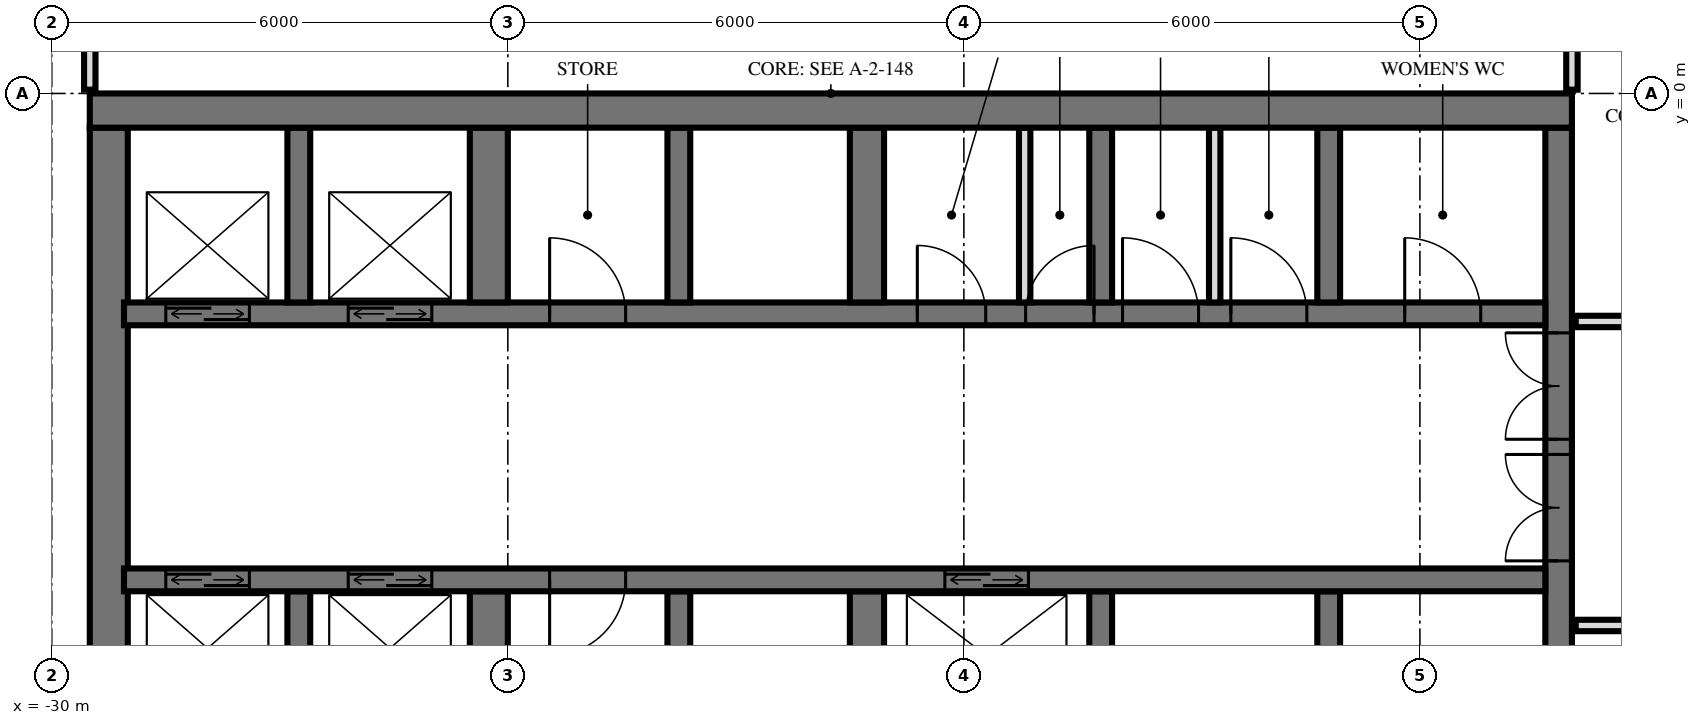
"""IFC4 building model, lengths in metres.
Left out: names, types, materials, properties, quantities, classifications, styles, units other than length and angle.
Written with IfcOpenShell. Run it as: python <this file> out.ifc"""

import sys

from ifc_helpers import new_model, si_unit, direction, frame, frame_2d, origin, place, context, subcontext, project, spatial, rectangle, extrude, element, fill, save


model = new_model("IFC4")
c1 = context("Model", 3, precision=1e-05, world=origin(), true_north=direction((0.0, 1.0)))
c2 = subcontext(c1, "Body", "Model", "MODEL_VIEW")
j1 = project(units=[si_unit("LENGTHUNIT", "METRE"), si_unit("PLANEANGLEUNIT", "RADIAN")], contexts=[c1])
p1 = place(None, origin())
s1 = spatial("IfcSite", under=j1, at=p1, CompositionType="ELEMENT")
p2 = place(p1, origin())
s2 = spatial("IfcBuilding", under=s1, at=p2, CompositionType="ELEMENT")
p3 = place(p2, frame((0.0, 0.0, 81.6)))
s3 = spatial("IfcBuildingStorey", under=s2, at=p3, CompositionType="ELEMENT", Elevation=81.6)
p4 = place(p3, frame((-29.5, -0.225, 0.0), z_axis=(0.0, 0.0, 1.0), x_axis=(1.0, 0.0, 0.0)))
e1 = element("IfcWall", 1, at=p4, inside=s3, PredefinedType="SHEAR", context=c2, shape_type="SweptSolid", body=[
    extrude(rectangle(XDim=19.5, YDim=0.45, at=frame_2d((9.75, 0.0))), origin(), (0.0, 0.0, 1.0), 3.6),
])
p5 = place(p3, frame((-10.175, -14.55, 0.0), z_axis=(0.0, 0.0, 1.0), x_axis=(0.0, 1.0, 0.0)))
e2 = element("IfcWall", 2, at=p5, inside=s3, PredefinedType="SHEAR", context=c2, shape_type="SweptSolid", body=[
    extrude(rectangle(XDim=14.1, YDim=0.35, at=frame_2d((7.05, 0.0))), origin(), (0.0, 0.0, 1.0), 3.6),
])
p6 = place(p5, frame((8.4, 0.0, 0.0)))
e3 = element("IfcOpeningElement", 3, at=p6, cuts=e2, PredefinedType="OPENING", context=c2, shape_type="SweptSolid", body=[
    extrude(rectangle(XDim=1.4, YDim=2.4, at=frame_2d((0.7, 1.2))), frame((0.0, 0.185, 0.0), z_axis=(0.0, -1.0, 0.0), x_axis=(1.0, 0.0, 0.0)), (0.0, 0.0, 1.0), 0.37),
])
p7 = place(p5, frame((10.0, 0.0, 0.0)))
e4 = element("IfcOpeningElement", 4, at=p7, cuts=e2, PredefinedType="OPENING", context=c2, shape_type="SweptSolid", body=[
    extrude(rectangle(XDim=1.4, YDim=2.4, at=frame_2d((0.7, 1.2))), frame((0.0, 0.185, 0.0), z_axis=(0.0, -1.0, 0.0), x_axis=(1.0, 0.0, 0.0)), (0.0, 0.0, 1.0), 0.37),
])
p8 = place(p5, frame((4.0, 0.0, 0.0)))
e5 = element("IfcOpeningElement", 5, at=p8, cuts=e2, PredefinedType="OPENING", context=c2, shape_type="SweptSolid", body=[
    extrude(rectangle(XDim=1.2, YDim=2.1, at=frame_2d((0.6, 1.05))), frame((0.0, 0.185, 0.0), z_axis=(0.0, -1.0, 0.0), x_axis=(1.0, 0.0, 0.0)), (0.0, 0.0, 1.0), 0.37),
])
p9 = place(p3, frame((-29.25, -14.55, 0.0), z_axis=(0.0, 0.0, 1.0), x_axis=(0.0, 1.0, 0.0)))
e6 = element("IfcWall", 6, at=p9, inside=s3, PredefinedType="SHEAR", context=c2, shape_type="SweptSolid", body=[
    extrude(rectangle(XDim=14.1, YDim=0.5, at=frame_2d((7.05, 0.0))), origin(), (0.0, 0.0, 1.0), 3.6),
])
p10 = place(p3, frame((-29.05, -2.9, 0.0), z_axis=(0.0, 0.0, 1.0), x_axis=(1.0, 0.0, 0.0)))
e7 = element("IfcWall", 7, at=p10, inside=s3, PredefinedType="SHEAR", context=c2, shape_type="SweptSolid", body=[
    extrude(rectangle(XDim=18.7, YDim=0.3, at=frame_2d((9.35, 0.0))), origin(), (0.0, 0.0, 1.0), 3.6),
])
p11 = place(p10, frame((2.95, 0.0, 0.0)))
e8 = element("IfcOpeningElement", 8, at=p11, cuts=e7, PredefinedType="OPENING", context=c2, shape_type="SweptSolid", body=[
    extrude(rectangle(XDim=1.1, YDim=2.1, at=frame_2d((0.55, 1.05))), frame((0.0, 0.16, 0.0), z_axis=(0.0, -1.0, 0.0), x_axis=(1.0, 0.0, 0.0)), (0.0, 0.0, 1.0), 0.32),
])
p12 = place(p10, frame((0.55, 0.0, 0.0)))
e9 = element("IfcOpeningElement", 9, at=p12, cuts=e7, PredefinedType="OPENING", context=c2, shape_type="SweptSolid", body=[
    extrude(rectangle(XDim=1.1, YDim=2.1, at=frame_2d((0.55, 1.05))), frame((0.0, 0.16, 0.0), z_axis=(0.0, -1.0, 0.0), x_axis=(1.0, 0.0, 0.0)), (0.0, 0.0, 1.0), 0.32),
])
p13 = place(p10, frame((11.863, 0.0, 0.0)))
e10 = element("IfcOpeningElement", 10, at=p13, cuts=e7, PredefinedType="OPENING", context=c2, shape_type="SweptSolid", body=[
    extrude(rectangle(XDim=0.9, YDim=2.1, at=frame_2d((0.45, 1.05))), frame((0.0, 0.16, 0.0), z_axis=(0.0, -1.0, 0.0), x_axis=(1.0, 0.0, 0.0)), (0.0, 0.0, 1.0), 0.32),
])
p14 = place(p10, frame((10.438, 0.0, 0.0)))
e11 = element("IfcOpeningElement", 11, at=p14, cuts=e7, PredefinedType="OPENING", context=c2, shape_type="SweptSolid", body=[
    extrude(rectangle(XDim=0.9, YDim=2.1, at=frame_2d((0.45, 1.05))), frame((0.0, 0.16, 0.0), z_axis=(0.0, -1.0, 0.0), x_axis=(1.0, 0.0, 0.0)), (0.0, 0.0, 1.0), 0.32),
])
p15 = place(p10, frame((16.85, 0.0, 0.0)))
e12 = element("IfcOpeningElement", 12, at=p15, cuts=e7, PredefinedType="OPENING", context=c2, shape_type="SweptSolid", body=[
    extrude(rectangle(XDim=1.0, YDim=2.1, at=frame_2d((0.5, 1.05))), frame((0.0, 0.16, 0.0), z_axis=(0.0, -1.0, 0.0), x_axis=(1.0, 0.0, 0.0)), (0.0, 0.0, 1.0), 0.32),
])
p16 = place(p10, frame((14.562, 0.0, 0.0)))
e13 = element("IfcOpeningElement", 13, at=p16, cuts=e7, PredefinedType="OPENING", context=c2, shape_type="SweptSolid", body=[
    extrude(rectangle(XDim=1.0, YDim=2.1, at=frame_2d((0.5, 1.05))), frame((0.0, 0.16, 0.0), z_axis=(0.0, -1.0, 0.0), x_axis=(1.0, 0.0, 0.0)), (0.0, 0.0, 1.0), 0.32),
])
p17 = place(p10, frame((13.137, 0.0, 0.0)))
e14 = element("IfcOpeningElement", 14, at=p17, cuts=e7, PredefinedType="OPENING", context=c2, shape_type="SweptSolid", body=[
    extrude(rectangle(XDim=1.0, YDim=2.1, at=frame_2d((0.5, 1.05))), frame((0.0, 0.16, 0.0), z_axis=(0.0, -1.0, 0.0), x_axis=(1.0, 0.0, 0.0)), (0.0, 0.0, 1.0), 0.32),
])
p18 = place(p10, frame((5.6, 0.0, 0.0)))
e15 = element("IfcOpeningElement", 15, at=p18, cuts=e7, PredefinedType="OPENING", context=c2, shape_type="SweptSolid", body=[
    extrude(rectangle(XDim=1.0, YDim=2.1, at=frame_2d((0.5, 1.05))), frame((0.0, 0.16, 0.0), z_axis=(0.0, -1.0, 0.0), x_axis=(1.0, 0.0, 0.0)), (0.0, 0.0, 1.0), 0.32),
])
p19 = place(p3, frame((-29.05, -6.4, 0.0), z_axis=(0.0, 0.0, 1.0), x_axis=(1.0, 0.0, 0.0)))
e16 = element("IfcWall", 16, at=p19, inside=s3, PredefinedType="SHEAR", context=c2, shape_type="SweptSolid", body=[
    extrude(rectangle(XDim=18.7, YDim=0.3, at=frame_2d((9.35, 0.0))), origin(), (0.0, 0.0, 1.0), 3.6),
])
p20 = place(p19, frame((2.95, 0.0, 0.0)))
e17 = element("IfcOpeningElement", 17, at=p20, cuts=e16, PredefinedType="OPENING", context=c2, shape_type="SweptSolid", body=[
    extrude(rectangle(XDim=1.1, YDim=2.1, at=frame_2d((0.55, 1.05))), frame((0.0, 0.16, 0.0), z_axis=(0.0, -1.0, 0.0), x_axis=(1.0, 0.0, 0.0)), (0.0, 0.0, 1.0), 0.32),
])
p21 = place(p19, frame((0.55, 0.0, 0.0)))
e18 = element("IfcOpeningElement", 18, at=p21, cuts=e16, PredefinedType="OPENING", context=c2, shape_type="SweptSolid", body=[
    extrude(rectangle(XDim=1.1, YDim=2.1, at=frame_2d((0.55, 1.05))), frame((0.0, 0.16, 0.0), z_axis=(0.0, -1.0, 0.0), x_axis=(1.0, 0.0, 0.0)), (0.0, 0.0, 1.0), 0.32),
])
p22 = place(p19, frame((10.8, 0.0, 0.0)))
e19 = element("IfcOpeningElement", 19, at=p22, cuts=e16, PredefinedType="OPENING", context=c2, shape_type="SweptSolid", body=[
    extrude(rectangle(XDim=1.1, YDim=2.1, at=frame_2d((0.55, 1.05))), frame((0.0, 0.16, 0.0), z_axis=(0.0, -1.0, 0.0), x_axis=(1.0, 0.0, 0.0)), (0.0, 0.0, 1.0), 0.32),
])
p23 = place(p19, frame((5.6, 0.0, 0.0)))
e20 = element("IfcOpeningElement", 20, at=p23, cuts=e16, PredefinedType="OPENING", context=c2, shape_type="SweptSolid", body=[
    extrude(rectangle(XDim=1.0, YDim=2.1, at=frame_2d((0.5, 1.05))), frame((0.0, 0.16, 0.0), z_axis=(0.0, -1.0, 0.0), x_axis=(1.0, 0.0, 0.0)), (0.0, 0.0, 1.0), 0.32),
])
for number, where, z_axis, x_axis in (
    (21, (-13.2, -2.75, 0.0), (0.0, 0.0, 1.0), (0.0, 1.0, 0.0)),
    (22, (-13.2, -8.85, 0.0), (0.0, 0.0, 1.0), (0.0, 1.0, 0.0)),
    (23, (-16.2, -2.75, 0.0), (0.0, 0.0, 1.0), (0.0, 1.0, 0.0)),
    (24, (-16.2, -8.85, 0.0), (0.0, 0.0, 1.0), (0.0, 1.0, 0.0)),
):
    element("IfcWall", number, at=place(p3, frame(where, z_axis=z_axis, x_axis=x_axis)), inside=s3, PredefinedType="SHEAR", context=c2, shape_type="SweptSolid", body=[
        extrude(rectangle(XDim=2.3, YDim=0.3, at=frame_2d((1.15, 0.0))), origin(), (0.0, 0.0, 1.0), 3.6),
    ])
for number, where, z_axis, x_axis in (
    (25, (-19.275, -2.75, 0.0), (0.0, 0.0, 1.0), (0.0, 1.0, 0.0)),
    (26, (-19.275, -8.85, 0.0), (0.0, 0.0, 1.0), (0.0, 1.0, 0.0)),
):
    element("IfcWall", number, at=place(p3, frame(where, z_axis=z_axis, x_axis=x_axis)), inside=s3, PredefinedType="SHEAR", context=c2, shape_type="SweptSolid", body=[
        extrude(rectangle(XDim=2.3, YDim=0.45, at=frame_2d((1.15, 0.0))), origin(), (0.0, 0.0, 1.0), 3.6),
    ])
for number, where, z_axis, x_axis in (
    (27, (-21.75, -2.75, 0.0), (0.0, 0.0, 1.0), (0.0, 1.0, 0.0)),
    (28, (-21.75, -8.85, 0.0), (0.0, 0.0, 1.0), (0.0, 1.0, 0.0)),
):
    element("IfcWall", number, at=place(p3, frame(where, z_axis=z_axis, x_axis=x_axis)), inside=s3, PredefinedType="SHEAR", context=c2, shape_type="SweptSolid", body=[
        extrude(rectangle(XDim=2.3, YDim=0.3, at=frame_2d((1.15, 0.0))), origin(), (0.0, 0.0, 1.0), 3.6),
    ])
for number, where, z_axis, x_axis in (
    (29, (-24.25, -2.75, 0.0), (0.0, 0.0, 1.0), (0.0, 1.0, 0.0)),
    (30, (-24.25, -8.85, 0.0), (0.0, 0.0, 1.0), (0.0, 1.0, 0.0)),
):
    element("IfcWall", number, at=place(p3, frame(where, z_axis=z_axis, x_axis=x_axis)), inside=s3, PredefinedType="SHEAR", context=c2, shape_type="SweptSolid", body=[
        extrude(rectangle(XDim=2.3, YDim=0.5, at=frame_2d((1.15, 0.0))), origin(), (0.0, 0.0, 1.0), 3.6),
    ])
for number, where, z_axis, x_axis in (
    (31, (-26.75, -2.75, 0.0), (0.0, 0.0, 1.0), (0.0, 1.0, 0.0)),
    (32, (-26.75, -8.85, 0.0), (0.0, 0.0, 1.0), (0.0, 1.0, 0.0)),
):
    element("IfcWall", number, at=place(p3, frame(where, z_axis=z_axis, x_axis=x_axis)), inside=s3, PredefinedType="SHEAR", context=c2, shape_type="SweptSolid", body=[
        extrude(rectangle(XDim=2.3, YDim=0.3, at=frame_2d((1.15, 0.0))), origin(), (0.0, 0.0, 1.0), 3.6),
    ])
for number, where, z_axis, x_axis in (
    (33, (-17.2, -2.75, 0.0), (0.0, 0.0, 1.0), (0.0, 1.0, 0.0)),
    (34, (-14.7, -2.75, 0.0), (0.0, 0.0, 1.0), (0.0, 1.0, 0.0)),
):
    element("IfcWall", number, at=place(p3, frame(where, z_axis=z_axis, x_axis=x_axis)), inside=s3, PredefinedType="PARTITIONING", context=c2, shape_type="SweptSolid", body=[
        extrude(rectangle(XDim=2.3, YDim=0.15, at=frame_2d((1.15, 0.0))), origin(), (0.0, 0.0, 1.0), 3.3),
    ])
p24 = place(p3, frame((-10.0, 0.05, 0.0), z_axis=(0.0, 0.0, 1.0), x_axis=(0.0, 1.0, 0.0)))
e35 = element("IfcWall", 35, at=p24, inside=s3, PredefinedType="PARTITIONING", context=c2, shape_type="SweptSolid", body=[
    extrude(rectangle(XDim=0.97, YDim=0.15, at=frame_2d((0.485, 0.0))), origin(), (0.0, 0.0, 1.0), 3.32),
])
p25 = place(p3, frame((-29.5, 0.05, 0.0), z_axis=(0.0, 0.0, 1.0), x_axis=(0.0, 1.0, 0.0)))
e36 = element("IfcWall", 36, at=p25, inside=s3, PredefinedType="PARTITIONING", context=c2, shape_type="SweptSolid", body=[
    extrude(rectangle(XDim=0.827, YDim=0.15, at=frame_2d((0.414, 0.0))), origin(), (0.0, 0.0, 1.0), 3.32),
])
p26 = place(p3, frame((-9.95, -7.0, 0.0), z_axis=(0.0, 0.0, 1.0), x_axis=(1.0, 0.0, 0.0)))
e37 = element("IfcWall", 37, at=p26, inside=s3, PredefinedType="PARTITIONING", context=c2, shape_type="SweptSolid", body=[
    extrude(rectangle(XDim=19.9, YDim=0.15, at=frame_2d((9.95, 0.0))), origin(), (0.0, 0.0, 1.0), 3.32),
])
p27 = place(p26, frame((9.45, 0.0, 0.0)))
e38 = element("IfcOpeningElement", 38, at=p27, cuts=e37, PredefinedType="OPENING", context=c2, shape_type="SweptSolid", body=[
    extrude(rectangle(XDim=1.0, YDim=2.1, at=frame_2d((0.5, 1.05))), frame((0.0, 0.085, 0.0), z_axis=(0.0, -1.0, 0.0), x_axis=(1.0, 0.0, 0.0)), (0.0, 0.0, 1.0), 0.17),
])
p28 = place(p26, frame((15.45, 0.0, 0.0)))
e39 = element("IfcOpeningElement", 39, at=p28, cuts=e37, PredefinedType="OPENING", context=c2, shape_type="SweptSolid", body=[
    extrude(rectangle(XDim=1.0, YDim=2.1, at=frame_2d((0.5, 1.05))), frame((0.0, 0.085, 0.0), z_axis=(0.0, -1.0, 0.0), x_axis=(1.0, 0.0, 0.0)), (0.0, 0.0, 1.0), 0.17),
])
p29 = place(p3, frame((-9.95, -3.0, 0.0), z_axis=(0.0, 0.0, 1.0), x_axis=(1.0, 0.0, 0.0)))
e40 = element("IfcWall", 40, at=p29, inside=s3, PredefinedType="PARTITIONING", context=c2, shape_type="SweptSolid", body=[
    extrude(rectangle(XDim=19.9, YDim=0.15, at=frame_2d((9.95, 0.0))), origin(), (0.0, 0.0, 1.0), 3.32),
])
p30 = place(p29, frame((2.2, 0.0, 0.0)))
e41 = element("IfcOpeningElement", 41, at=p30, cuts=e40, PredefinedType="OPENING", context=c2, shape_type="SweptSolid", body=[
    extrude(rectangle(XDim=1.0, YDim=2.1, at=frame_2d((0.5, 1.05))), frame((0.0, 0.085, 0.0), z_axis=(0.0, -1.0, 0.0), x_axis=(1.0, 0.0, 0.0)), (0.0, 0.0, 1.0), 0.17),
])
p31 = place(p29, frame((7.2, 0.0, 0.0)))
e42 = element("IfcOpeningElement", 42, at=p31, cuts=e40, PredefinedType="OPENING", context=c2, shape_type="SweptSolid", body=[
    extrude(rectangle(XDim=1.0, YDim=2.1, at=frame_2d((0.5, 1.05))), frame((0.0, 0.085, 0.0), z_axis=(0.0, -1.0, 0.0), x_axis=(1.0, 0.0, 0.0)), (0.0, 0.0, 1.0), 0.17),
])
p32 = place(p29, frame((11.7, 0.0, 0.0)))
e43 = element("IfcOpeningElement", 43, at=p32, cuts=e40, PredefinedType="OPENING", context=c2, shape_type="SweptSolid", body=[
    extrude(rectangle(XDim=1.0, YDim=2.1, at=frame_2d((0.5, 1.05))), frame((0.0, 0.085, 0.0), z_axis=(0.0, -1.0, 0.0), x_axis=(1.0, 0.0, 0.0)), (0.0, 0.0, 1.0), 0.17),
])
p33 = place(p29, frame((15.45, 0.0, 0.0)))
e44 = element("IfcOpeningElement", 44, at=p33, cuts=e40, PredefinedType="OPENING", context=c2, shape_type="SweptSolid", body=[
    extrude(rectangle(XDim=1.0, YDim=2.1, at=frame_2d((0.5, 1.05))), frame((0.0, 0.085, 0.0), z_axis=(0.0, -1.0, 0.0), x_axis=(1.0, 0.0, 0.0)), (0.0, 0.0, 1.0), 0.17),
])
p34 = place(p29, frame((18.2, 0.0, 0.0)))
e45 = element("IfcOpeningElement", 45, at=p34, cuts=e40, PredefinedType="OPENING", context=c2, shape_type="SweptSolid", body=[
    extrude(rectangle(XDim=1.0, YDim=2.1, at=frame_2d((0.5, 1.05))), frame((0.0, 0.085, 0.0), z_axis=(0.0, -1.0, 0.0), x_axis=(1.0, 0.0, 0.0)), (0.0, 0.0, 1.0), 0.17),
])
p35 = place(p11, origin())
e46 = element("IfcDoor", 46, at=p35, inside=s3, OperationType="DOUBLE_DOOR_SLIDING", PredefinedType="USERDEFINED", context=c2, shape_type="SweptSolid", body=[
    extrude(rectangle(XDim=1.1, YDim=2.1, at=frame_2d((0.55, 1.05))), frame((0.0, 0.025, 0.0), z_axis=(0.0, -1.0, 0.0), x_axis=(1.0, 0.0, 0.0)), (0.0, 0.0, 1.0), 0.05),
])
fill(e8, e46)
p36 = place(p12, origin())
e47 = element("IfcDoor", 47, at=p36, inside=s3, OperationType="DOUBLE_DOOR_SLIDING", PredefinedType="USERDEFINED", context=c2, shape_type="SweptSolid", body=[
    extrude(rectangle(XDim=1.1, YDim=2.1, at=frame_2d((0.55, 1.05))), frame((0.0, 0.025, 0.0), z_axis=(0.0, -1.0, 0.0), x_axis=(1.0, 0.0, 0.0)), (0.0, 0.0, 1.0), 0.05),
])
fill(e9, e47)
p37 = place(p20, origin())
e48 = element("IfcDoor", 48, at=p37, inside=s3, OperationType="DOUBLE_DOOR_SLIDING", PredefinedType="USERDEFINED", context=c2, shape_type="SweptSolid", body=[
    extrude(rectangle(XDim=1.1, YDim=2.1, at=frame_2d((0.55, 1.05))), frame((0.0, 0.025, 0.0), z_axis=(0.0, -1.0, 0.0), x_axis=(1.0, 0.0, 0.0)), (0.0, 0.0, 1.0), 0.05),
])
fill(e17, e48)
p38 = place(p21, origin())
e49 = element("IfcDoor", 49, at=p38, inside=s3, OperationType="DOUBLE_DOOR_SLIDING", PredefinedType="USERDEFINED", context=c2, shape_type="SweptSolid", body=[
    extrude(rectangle(XDim=1.1, YDim=2.1, at=frame_2d((0.55, 1.05))), frame((0.0, 0.025, 0.0), z_axis=(0.0, -1.0, 0.0), x_axis=(1.0, 0.0, 0.0)), (0.0, 0.0, 1.0), 0.05),
])
fill(e18, e49)
p39 = place(p22, origin())
e50 = element("IfcDoor", 50, at=p39, inside=s3, OperationType="DOUBLE_DOOR_SLIDING", PredefinedType="USERDEFINED", context=c2, shape_type="SweptSolid", body=[
    extrude(rectangle(XDim=1.1, YDim=2.1, at=frame_2d((0.55, 1.05))), frame((0.0, 0.025, 0.0), z_axis=(0.0, -1.0, 0.0), x_axis=(1.0, 0.0, 0.0)), (0.0, 0.0, 1.0), 0.05),
])
fill(e19, e50)
p40 = place(p6, origin())
e51 = element("IfcDoor", 51, at=p40, inside=s3, OperationType="DOUBLE_DOOR_SINGLE_SWING", PredefinedType="DOOR", context=c2, shape_type="SweptSolid", body=[
    extrude(rectangle(XDim=1.4, YDim=2.4, at=frame_2d((0.7, 1.2))), frame((0.0, 0.025, 0.0), z_axis=(0.0, -1.0, 0.0), x_axis=(1.0, 0.0, 0.0)), (0.0, 0.0, 1.0), 0.05),
])
fill(e3, e51)
p41 = place(p7, origin())
e52 = element("IfcDoor", 52, at=p41, inside=s3, OperationType="DOUBLE_DOOR_SINGLE_SWING", PredefinedType="DOOR", context=c2, shape_type="SweptSolid", body=[
    extrude(rectangle(XDim=1.4, YDim=2.4, at=frame_2d((0.7, 1.2))), frame((0.0, 0.025, 0.0), z_axis=(0.0, -1.0, 0.0), x_axis=(1.0, 0.0, 0.0)), (0.0, 0.0, 1.0), 0.05),
])
fill(e4, e52)
p42 = place(p13, origin())
e53 = element("IfcDoor", 53, at=p42, inside=s3, OperationType="SINGLE_SWING_LEFT", PredefinedType="DOOR", context=c2, shape_type="SweptSolid", body=[
    extrude(rectangle(XDim=0.9, YDim=2.1, at=frame_2d((0.45, 1.05))), frame((0.0, 0.025, 0.0), z_axis=(0.0, -1.0, 0.0), x_axis=(1.0, 0.0, 0.0)), (0.0, 0.0, 1.0), 0.05),
])
fill(e10, e53)
p43 = place(p14, origin())
e54 = element("IfcDoor", 54, at=p43, inside=s3, OperationType="SINGLE_SWING_RIGHT", PredefinedType="DOOR", context=c2, shape_type="SweptSolid", body=[
    extrude(rectangle(XDim=0.9, YDim=2.1, at=frame_2d((0.45, 1.05))), frame((0.0, 0.025, 0.0), z_axis=(0.0, -1.0, 0.0), x_axis=(1.0, 0.0, 0.0)), (0.0, 0.0, 1.0), 0.05),
])
fill(e11, e54)
p44 = place(p15, origin())
e55 = element("IfcDoor", 55, at=p44, inside=s3, OperationType="SINGLE_SWING_RIGHT", PredefinedType="DOOR", context=c2, shape_type="SweptSolid", body=[
    extrude(rectangle(XDim=1.0, YDim=2.1, at=frame_2d((0.5, 1.05))), frame((0.0, 0.025, 0.0), z_axis=(0.0, -1.0, 0.0), x_axis=(1.0, 0.0, 0.0)), (0.0, 0.0, 1.0), 0.05),
])
fill(e12, e55)
p45 = place(p16, origin())
e56 = element("IfcDoor", 56, at=p45, inside=s3, OperationType="SINGLE_SWING_RIGHT", PredefinedType="DOOR", context=c2, shape_type="SweptSolid", body=[
    extrude(rectangle(XDim=1.0, YDim=2.1, at=frame_2d((0.5, 1.05))), frame((0.0, 0.025, 0.0), z_axis=(0.0, -1.0, 0.0), x_axis=(1.0, 0.0, 0.0)), (0.0, 0.0, 1.0), 0.05),
])
fill(e13, e56)
p46 = place(p17, origin())
e57 = element("IfcDoor", 57, at=p46, inside=s3, OperationType="SINGLE_SWING_RIGHT", PredefinedType="DOOR", context=c2, shape_type="SweptSolid", body=[
    extrude(rectangle(XDim=1.0, YDim=2.1, at=frame_2d((0.5, 1.05))), frame((0.0, 0.025, 0.0), z_axis=(0.0, -1.0, 0.0), x_axis=(1.0, 0.0, 0.0)), (0.0, 0.0, 1.0), 0.05),
])
fill(e14, e57)
p47 = place(p18, origin())
e58 = element("IfcDoor", 58, at=p47, inside=s3, OperationType="SINGLE_SWING_RIGHT", PredefinedType="DOOR", context=c2, shape_type="SweptSolid", body=[
    extrude(rectangle(XDim=1.0, YDim=2.1, at=frame_2d((0.5, 1.05))), frame((0.0, 0.025, 0.0), z_axis=(0.0, -1.0, 0.0), x_axis=(1.0, 0.0, 0.0)), (0.0, 0.0, 1.0), 0.05),
])
fill(e15, e58)
p48 = place(p23, frame((0.5, 0.0, 0.0), z_axis=(0.0, 0.0, 1.0), x_axis=(-1.0, 0.0, 0.0)))
e59 = element("IfcDoor", 59, at=p48, inside=s3, OperationType="SINGLE_SWING_LEFT", PredefinedType="DOOR", context=c2, shape_type="SweptSolid", body=[
    extrude(rectangle(XDim=1.0, YDim=2.1, at=frame_2d((0.0, 1.05))), frame((0.0, -0.025, 0.0), z_axis=(0.0, 1.0, 0.0), x_axis=(-1.0, 0.0, 0.0)), (0.0, 0.0, 1.0), 0.05),
])
fill(e20, e59)
save(model, sys.argv[1])
